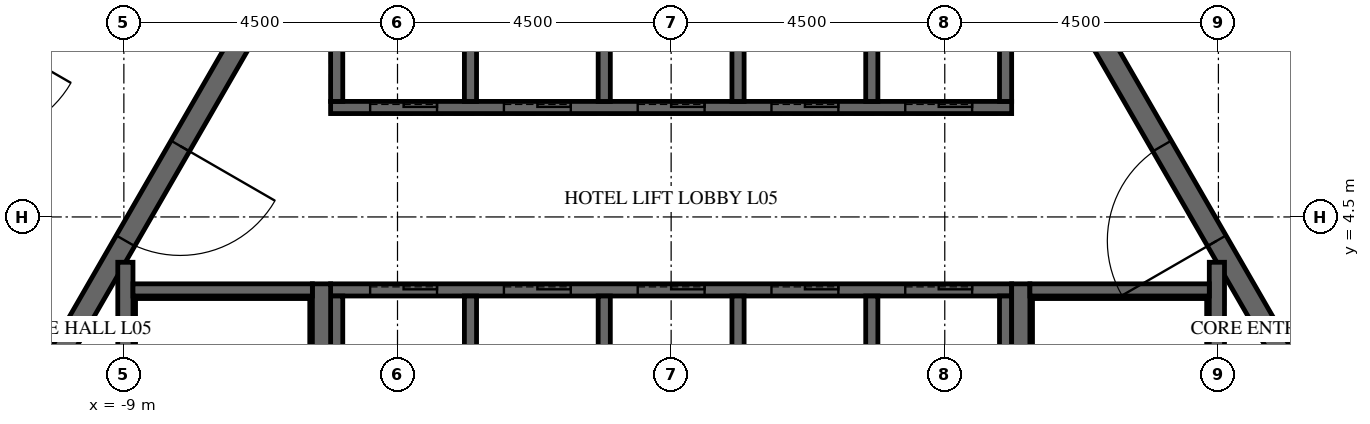
"""IFC4 building model, lengths in metres.
Left out: names, types, materials, properties, quantities, classifications, styles, units other than length and angle.
Written with IfcOpenShell. Run it as: python <this file> out.ifc"""

import sys

from ifc_helpers import new_model, si_unit, direction, frame, frame_2d, origin, place, context, subcontext, project, spatial, polyline, rectangle, outline, extrude, element, fill, save


model = new_model("IFC4")
c1 = context("Model", 3, precision=1e-05, world=origin(), true_north=direction((0.0, 1.0)))
c2 = subcontext(c1, "Body", "Model", "MODEL_VIEW")
j1 = project(units=[si_unit("LENGTHUNIT", "METRE"), si_unit("PLANEANGLEUNIT", "RADIAN")], contexts=[c1])
p1 = place(None, origin())
s1 = spatial("IfcSite", under=j1, at=p1, CompositionType="ELEMENT")
p2 = place(p1, origin())
s2 = spatial("IfcBuilding", under=s1, at=p2, CompositionType="ELEMENT")
p3 = place(p2, frame((0.0, 0.0, 31.5)))
s3 = spatial("IfcBuildingStorey", under=s2, at=p3, CompositionType="ELEMENT", Elevation=31.5)
p4 = place(p3, frame((-7.91, 13.7, -0.3), z_axis=(0.0, 0.0, 1.0), x_axis=(-0.499999880136, -0.866025472988, 0.0)))
e1 = element("IfcWall", 1, at=p4, inside=s3, PredefinedType="SHEAR", context=c2, shape_type="SweptSolid", body=[
    extrude(outline(polyline([(-0.173, -0.3), (15.993, -0.3), (15.646, 0.3), (0.173, 0.3), (-0.173, -0.3)])), origin(), (0.0, 0.0, 1.0), 6.15),
])
p5 = place(p4, frame((7.039, 0.0, 0.3)))
e2 = element("IfcOpeningElement", 2, at=p5, cuts=e1, PredefinedType="OPENING", context=c2, shape_type="SweptSolid", body=[
    extrude(rectangle(XDim=1.8, YDim=2.4, at=frame_2d((0.9, 1.2))), frame((0.0, 0.31, 0.0), z_axis=(0.0, -1.0, 0.0), x_axis=(1.0, 0.0, 0.0)), (0.0, 0.0, 1.0), 0.62),
])
p6 = place(p3, frame((15.819, 0.0, -0.3), z_axis=(0.0, 0.0, 1.0), x_axis=(-0.499999880136, 0.866025472988, 0.0)))
e3 = element("IfcWall", 3, at=p6, inside=s3, PredefinedType="SHEAR", context=c2, shape_type="SweptSolid", body=[
    extrude(outline(polyline([(-0.173, -0.3), (15.993, -0.3), (15.646, 0.3), (0.173, 0.3), (-0.173, -0.3)])), origin(), (0.0, 0.0, 1.0), 6.15),
])
p7 = place(p6, frame((6.981, 0.0, 0.3)))
e4 = element("IfcOpeningElement", 4, at=p7, cuts=e3, PredefinedType="OPENING", context=c2, shape_type="SweptSolid", body=[
    extrude(rectangle(XDim=1.8, YDim=2.4, at=frame_2d((0.9, 1.2))), frame((0.0, 0.31, 0.0), z_axis=(0.0, -1.0, 0.0), x_axis=(1.0, 0.0, 0.0)), (0.0, 0.0, 1.0), 0.62),
])
p8 = place(p3, frame((-5.673, 9.825, -0.3), z_axis=(0.0, 0.0, 1.0), x_axis=(-0.499995046907, -0.866028263435, 0.0)))
e5 = element("IfcWall", 5, at=p8, inside=s3, PredefinedType="SHEAR", context=c2, shape_type="SweptSolid", body=[
    extrude(outline(polyline([(-0.101, -0.175), (11.446, -0.175), (11.244, 0.175), (0.101, 0.175), (-0.101, -0.175)])), origin(), (0.0, 0.0, 1.0), 6.15),
])
p9 = place(p8, frame((4.801, 0.0, 0.3)))
e6 = element("IfcOpeningElement", 6, at=p9, cuts=e5, PredefinedType="OPENING", context=c2, shape_type="SweptSolid", body=[
    extrude(rectangle(XDim=1.8, YDim=2.4, at=frame_2d((0.9, 1.2))), frame((0.0, 0.185, 0.0), z_axis=(0.0, -1.0, 0.0), x_axis=(1.0, 0.0, 0.0)), (0.0, 0.0, 1.0), 0.37),
])
p10 = place(p3, frame((11.345, 0.0, -0.3), z_axis=(0.0, 0.0, 1.0), x_axis=(-0.499995046907, 0.866028263435, 0.0)))
e7 = element("IfcWall", 7, at=p10, inside=s3, PredefinedType="SHEAR", context=c2, shape_type="SweptSolid", body=[
    extrude(outline(polyline([(-0.101, -0.175), (11.446, -0.175), (11.244, 0.175), (0.101, 0.175), (-0.101, -0.175)])), origin(), (0.0, 0.0, 1.0), 6.15),
])
p11 = place(p10, frame((4.744, 0.0, 0.3)))
e8 = element("IfcOpeningElement", 8, at=p11, cuts=e7, PredefinedType="OPENING", context=c2, shape_type="SweptSolid", body=[
    extrude(rectangle(XDim=1.8, YDim=2.4, at=frame_2d((0.9, 1.2))), frame((0.0, 0.185, 0.0), z_axis=(0.0, -1.0, 0.0), x_axis=(1.0, 0.0, 0.0)), (0.0, 0.0, 1.0), 0.37),
])
p12 = place(p3, frame((-5.6, 6.3, -0.25), z_axis=(0.0, 0.0, 1.0), x_axis=(1.0, 0.0, 0.0)))
e9 = element("IfcWall", 9, at=p12, inside=s3, PredefinedType="SHEAR", context=c2, shape_type="SweptSolid", body=[
    extrude(rectangle(XDim=11.2, YDim=0.2, at=frame_2d((5.6, 0.0))), origin(), (0.0, 0.0, 1.0), 6.0),
])
p13 = place(p12, frame((0.65, 0.0, 0.25)))
e10 = element("IfcOpeningElement", 10, at=p13, cuts=e9, PredefinedType="OPENING", context=c2, shape_type="SweptSolid", body=[
    extrude(rectangle(XDim=1.1, YDim=2.1, at=frame_2d((0.55, 1.05))), frame((0.0, 0.11, 0.0), z_axis=(0.0, -1.0, 0.0), x_axis=(1.0, 0.0, 0.0)), (0.0, 0.0, 1.0), 0.22),
])
p14 = place(p12, frame((2.85, 0.0, 0.25)))
e11 = element("IfcOpeningElement", 11, at=p14, cuts=e9, PredefinedType="OPENING", context=c2, shape_type="SweptSolid", body=[
    extrude(rectangle(XDim=1.1, YDim=2.1, at=frame_2d((0.55, 1.05))), frame((0.0, 0.11, 0.0), z_axis=(0.0, -1.0, 0.0), x_axis=(1.0, 0.0, 0.0)), (0.0, 0.0, 1.0), 0.22),
])
p15 = place(p12, frame((5.05, 0.0, 0.25)))
e12 = element("IfcOpeningElement", 12, at=p15, cuts=e9, PredefinedType="OPENING", context=c2, shape_type="SweptSolid", body=[
    extrude(rectangle(XDim=1.1, YDim=2.1, at=frame_2d((0.55, 1.05))), frame((0.0, 0.11, 0.0), z_axis=(0.0, -1.0, 0.0), x_axis=(1.0, 0.0, 0.0)), (0.0, 0.0, 1.0), 0.22),
])
p16 = place(p12, frame((7.25, 0.0, 0.25)))
e13 = element("IfcOpeningElement", 13, at=p16, cuts=e9, PredefinedType="OPENING", context=c2, shape_type="SweptSolid", body=[
    extrude(rectangle(XDim=1.1, YDim=2.1, at=frame_2d((0.55, 1.05))), frame((0.0, 0.11, 0.0), z_axis=(0.0, -1.0, 0.0), x_axis=(1.0, 0.0, 0.0)), (0.0, 0.0, 1.0), 0.22),
])
p17 = place(p12, frame((9.45, 0.0, 0.25)))
e14 = element("IfcOpeningElement", 14, at=p17, cuts=e9, PredefinedType="OPENING", context=c2, shape_type="SweptSolid", body=[
    extrude(rectangle(XDim=1.1, YDim=2.1, at=frame_2d((0.55, 1.05))), frame((0.0, 0.11, 0.0), z_axis=(0.0, -1.0, 0.0), x_axis=(1.0, 0.0, 0.0)), (0.0, 0.0, 1.0), 0.22),
])
for number, where, z_axis, x_axis in (
    (15, (-5.5, 6.4, -0.25), (0.0, 0.0, 1.0), (0.0, 1.0, 0.0)),
    (16, (-3.3, 6.4, -0.25), (0.0, 0.0, 1.0), (0.0, 1.0, 0.0)),
    (17, (-1.1, 6.4, -0.25), (0.0, 0.0, 1.0), (0.0, 1.0, 0.0)),
    (18, (1.1, 6.4, -0.25), (0.0, 0.0, 1.0), (0.0, 1.0, 0.0)),
    (19, (3.3, 6.4, -0.25), (0.0, 0.0, 1.0), (0.0, 1.0, 0.0)),
    (20, (5.5, 6.4, -0.25), (0.0, 0.0, 1.0), (0.0, 1.0, 0.0)),
):
    element("IfcWall", number, at=place(p3, frame(where, z_axis=z_axis, x_axis=x_axis)), inside=s3, PredefinedType="SHEAR", context=c2, shape_type="SweptSolid", body=[
        extrude(rectangle(XDim=2.9, YDim=0.2, at=frame_2d((1.45, 0.0))), origin(), (0.0, 0.0, 1.0), 6.0),
    ])
p18 = place(p3, frame((-5.6, 3.3, -0.25), z_axis=(0.0, 0.0, 1.0), x_axis=(1.0, 0.0, 0.0)))
e21 = element("IfcWall", 21, at=p18, inside=s3, PredefinedType="SHEAR", context=c2, shape_type="SweptSolid", body=[
    extrude(rectangle(XDim=11.2, YDim=0.2, at=frame_2d((5.6, 0.0))), origin(), (0.0, 0.0, 1.0), 6.0),
])
p19 = place(p18, frame((0.65, 0.0, 0.25)))
e22 = element("IfcOpeningElement", 22, at=p19, cuts=e21, PredefinedType="OPENING", context=c2, shape_type="SweptSolid", body=[
    extrude(rectangle(XDim=1.1, YDim=2.1, at=frame_2d((0.55, 1.05))), frame((0.0, 0.11, 0.0), z_axis=(0.0, -1.0, 0.0), x_axis=(1.0, 0.0, 0.0)), (0.0, 0.0, 1.0), 0.22),
])
p20 = place(p18, frame((2.85, 0.0, 0.25)))
e23 = element("IfcOpeningElement", 23, at=p20, cuts=e21, PredefinedType="OPENING", context=c2, shape_type="SweptSolid", body=[
    extrude(rectangle(XDim=1.1, YDim=2.1, at=frame_2d((0.55, 1.05))), frame((0.0, 0.11, 0.0), z_axis=(0.0, -1.0, 0.0), x_axis=(1.0, 0.0, 0.0)), (0.0, 0.0, 1.0), 0.22),
])
p21 = place(p18, frame((5.05, 0.0, 0.25)))
e24 = element("IfcOpeningElement", 24, at=p21, cuts=e21, PredefinedType="OPENING", context=c2, shape_type="SweptSolid", body=[
    extrude(rectangle(XDim=1.1, YDim=2.1, at=frame_2d((0.55, 1.05))), frame((0.0, 0.11, 0.0), z_axis=(0.0, -1.0, 0.0), x_axis=(1.0, 0.0, 0.0)), (0.0, 0.0, 1.0), 0.22),
])
p22 = place(p18, frame((7.25, 0.0, 0.25)))
e25 = element("IfcOpeningElement", 25, at=p22, cuts=e21, PredefinedType="OPENING", context=c2, shape_type="SweptSolid", body=[
    extrude(rectangle(XDim=1.1, YDim=2.1, at=frame_2d((0.55, 1.05))), frame((0.0, 0.11, 0.0), z_axis=(0.0, -1.0, 0.0), x_axis=(1.0, 0.0, 0.0)), (0.0, 0.0, 1.0), 0.22),
])
p23 = place(p18, frame((9.45, 0.0, 0.25)))
e26 = element("IfcOpeningElement", 26, at=p23, cuts=e21, PredefinedType="OPENING", context=c2, shape_type="SweptSolid", body=[
    extrude(rectangle(XDim=1.1, YDim=2.1, at=frame_2d((0.55, 1.05))), frame((0.0, 0.11, 0.0), z_axis=(0.0, -1.0, 0.0), x_axis=(1.0, 0.0, 0.0)), (0.0, 0.0, 1.0), 0.22),
])
for number, where, z_axis, x_axis in (
    (27, (-5.5, 0.1, -0.25), (0.0, 0.0, 1.0), (0.0, 1.0, 0.0)),
    (28, (-3.3, 0.1, -0.25), (0.0, 0.0, 1.0), (0.0, 1.0, 0.0)),
    (29, (-1.1, 0.1, -0.25), (0.0, 0.0, 1.0), (0.0, 1.0, 0.0)),
    (30, (1.1, 0.1, -0.25), (0.0, 0.0, 1.0), (0.0, 1.0, 0.0)),
    (31, (3.3, 0.1, -0.25), (0.0, 0.0, 1.0), (0.0, 1.0, 0.0)),
    (32, (5.5, 0.1, -0.25), (0.0, 0.0, 1.0), (0.0, 1.0, 0.0)),
):
    element("IfcWall", number, at=place(p3, frame(where, z_axis=z_axis, x_axis=x_axis)), inside=s3, PredefinedType="SHEAR", context=c2, shape_type="SweptSolid", body=[
        extrude(rectangle(XDim=3.1, YDim=0.2, at=frame_2d((1.55, 0.0))), origin(), (0.0, 0.0, 1.0), 6.0),
    ])
p24 = place(p3, frame((5.75, -3.4, -0.25), z_axis=(0.0, 0.0, 1.0), x_axis=(0.0, 1.0, 0.0)))
e33 = element("IfcWall", 33, at=p24, inside=s3, PredefinedType="SHEAR", context=c2, shape_type="SweptSolid", body=[
    extrude(rectangle(XDim=6.8, YDim=0.3, at=frame_2d((3.4, 0.0))), origin(), (0.0, 0.0, 1.0), 6.0),
])
p25 = place(p3, frame((8.975, -3.755, -0.25), z_axis=(0.0, 0.0, 1.0), x_axis=(0.0, 1.0, 0.0)))
e34 = element("IfcWall", 34, at=p25, inside=s3, PredefinedType="SHEAR", context=c2, shape_type="SweptSolid", body=[
    extrude(rectangle(XDim=7.51, YDim=0.25, at=frame_2d((3.755, 0.0))), origin(), (0.0, 0.0, 1.0), 6.0),
])
p26 = place(p3, frame((5.9, 3.3, -0.25), z_axis=(0.0, 0.0, 1.0), x_axis=(1.0, 0.0, 0.0)))
e35 = element("IfcWall", 35, at=p26, inside=s3, PredefinedType="SHEAR", context=c2, shape_type="SweptSolid", body=[
    extrude(rectangle(XDim=2.95, YDim=0.2, at=frame_2d((1.475, 0.0))), origin(), (0.0, 0.0, 1.0), 6.0),
])
p27 = place(p3, frame((-5.75, -3.4, -0.25), z_axis=(0.0, 0.0, 1.0), x_axis=(0.0, 1.0, 0.0)))
e36 = element("IfcWall", 36, at=p27, inside=s3, PredefinedType="SHEAR", context=c2, shape_type="SweptSolid", body=[
    extrude(rectangle(XDim=6.8, YDim=0.3, at=frame_2d((3.4, 0.0))), origin(), (0.0, 0.0, 1.0), 6.0),
])
p28 = place(p3, frame((-8.975, -3.755, -0.25), z_axis=(0.0, 0.0, 1.0), x_axis=(0.0, 1.0, 0.0)))
e37 = element("IfcWall", 37, at=p28, inside=s3, PredefinedType="SHEAR", context=c2, shape_type="SweptSolid", body=[
    extrude(rectangle(XDim=7.51, YDim=0.25, at=frame_2d((3.755, 0.0))), origin(), (0.0, 0.0, 1.0), 6.0),
])
p29 = place(p3, frame((-8.85, 3.3, -0.25), z_axis=(0.0, 0.0, 1.0), x_axis=(1.0, 0.0, 0.0)))
e38 = element("IfcWall", 38, at=p29, inside=s3, PredefinedType="SHEAR", context=c2, shape_type="SweptSolid", body=[
    extrude(rectangle(XDim=2.95, YDim=0.2, at=frame_2d((1.475, 0.0))), origin(), (0.0, 0.0, 1.0), 6.0),
])
p30 = place(p3, frame((18.513, 2.734, 0.0), z_axis=(0.0, 0.0, 1.0), x_axis=(-0.499982347303, 0.866035595334, 0.0)))
e39 = element("IfcWall", 39, at=p30, inside=s3, PredefinedType="PARTITIONING", context=c2, shape_type="SweptSolid", body=[
    extrude(rectangle(XDim=16.588, YDim=0.2, at=frame_2d((8.294, 0.0))), origin(), (0.0, 0.0, 1.0), 5.85),
])
p31 = place(p9, origin())
e40 = element("IfcDoor", 40, at=p31, inside=s3, OperationType="DOUBLE_DOOR_SINGLE_SWING", PredefinedType="DOOR", context=c2, shape_type="SweptSolid", body=[
    extrude(rectangle(XDim=1.8, YDim=2.4, at=frame_2d((0.9, 1.2))), frame((0.0, 0.025, 0.0), z_axis=(0.0, -1.0, 0.0), x_axis=(1.0, 0.0, 0.0)), (0.0, 0.0, 1.0), 0.05),
])
fill(e6, e40)
p32 = place(p11, origin())
e41 = element("IfcDoor", 41, at=p32, inside=s3, OperationType="DOUBLE_DOOR_SINGLE_SWING", PredefinedType="DOOR", context=c2, shape_type="SweptSolid", body=[
    extrude(rectangle(XDim=1.8, YDim=2.4, at=frame_2d((0.9, 1.2))), frame((0.0, 0.025, 0.0), z_axis=(0.0, -1.0, 0.0), x_axis=(1.0, 0.0, 0.0)), (0.0, 0.0, 1.0), 0.05),
])
fill(e8, e41)
p33 = place(p13, origin())
e42 = element("IfcDoor", 42, at=p33, inside=s3, OperationType="SLIDING_TO_LEFT", PredefinedType="DOOR", context=c2, shape_type="SweptSolid", body=[
    extrude(rectangle(XDim=1.1, YDim=2.1, at=frame_2d((0.55, 1.05))), frame((0.0, 0.025, 0.0), z_axis=(0.0, -1.0, 0.0), x_axis=(1.0, 0.0, 0.0)), (0.0, 0.0, 1.0), 0.05),
])
fill(e10, e42)
p34 = place(p14, origin())
e43 = element("IfcDoor", 43, at=p34, inside=s3, OperationType="SLIDING_TO_LEFT", PredefinedType="DOOR", context=c2, shape_type="SweptSolid", body=[
    extrude(rectangle(XDim=1.1, YDim=2.1, at=frame_2d((0.55, 1.05))), frame((0.0, 0.025, 0.0), z_axis=(0.0, -1.0, 0.0), x_axis=(1.0, 0.0, 0.0)), (0.0, 0.0, 1.0), 0.05),
])
fill(e11, e43)
p35 = place(p15, origin())
e44 = element("IfcDoor", 44, at=p35, inside=s3, OperationType="SLIDING_TO_LEFT", PredefinedType="DOOR", context=c2, shape_type="SweptSolid", body=[
    extrude(rectangle(XDim=1.1, YDim=2.1, at=frame_2d((0.55, 1.05))), frame((0.0, 0.025, 0.0), z_axis=(0.0, -1.0, 0.0), x_axis=(1.0, 0.0, 0.0)), (0.0, 0.0, 1.0), 0.05),
])
fill(e12, e44)
p36 = place(p16, origin())
e45 = element("IfcDoor", 45, at=p36, inside=s3, OperationType="SLIDING_TO_LEFT", PredefinedType="DOOR", context=c2, shape_type="SweptSolid", body=[
    extrude(rectangle(XDim=1.1, YDim=2.1, at=frame_2d((0.55, 1.05))), frame((0.0, 0.025, 0.0), z_axis=(0.0, -1.0, 0.0), x_axis=(1.0, 0.0, 0.0)), (0.0, 0.0, 1.0), 0.05),
])
fill(e13, e45)
p37 = place(p17, origin())
e46 = element("IfcDoor", 46, at=p37, inside=s3, OperationType="SLIDING_TO_LEFT", PredefinedType="DOOR", context=c2, shape_type="SweptSolid", body=[
    extrude(rectangle(XDim=1.1, YDim=2.1, at=frame_2d((0.55, 1.05))), frame((0.0, 0.025, 0.0), z_axis=(0.0, -1.0, 0.0), x_axis=(1.0, 0.0, 0.0)), (0.0, 0.0, 1.0), 0.05),
])
fill(e14, e46)
p38 = place(p19, origin())
e47 = element("IfcDoor", 47, at=p38, inside=s3, OperationType="SLIDING_TO_LEFT", PredefinedType="DOOR", context=c2, shape_type="SweptSolid", body=[
    extrude(rectangle(XDim=1.1, YDim=2.1, at=frame_2d((0.55, 1.05))), frame((0.0, 0.025, 0.0), z_axis=(0.0, -1.0, 0.0), x_axis=(1.0, 0.0, 0.0)), (0.0, 0.0, 1.0), 0.05),
])
fill(e22, e47)
p39 = place(p20, origin())
e48 = element("IfcDoor", 48, at=p39, inside=s3, OperationType="SLIDING_TO_LEFT", PredefinedType="DOOR", context=c2, shape_type="SweptSolid", body=[
    extrude(rectangle(XDim=1.1, YDim=2.1, at=frame_2d((0.55, 1.05))), frame((0.0, 0.025, 0.0), z_axis=(0.0, -1.0, 0.0), x_axis=(1.0, 0.0, 0.0)), (0.0, 0.0, 1.0), 0.05),
])
fill(e23, e48)
p40 = place(p21, origin())
e49 = element("IfcDoor", 49, at=p40, inside=s3, OperationType="SLIDING_TO_LEFT", PredefinedType="DOOR", context=c2, shape_type="SweptSolid", body=[
    extrude(rectangle(XDim=1.1, YDim=2.1, at=frame_2d((0.55, 1.05))), frame((0.0, 0.025, 0.0), z_axis=(0.0, -1.0, 0.0), x_axis=(1.0, 0.0, 0.0)), (0.0, 0.0, 1.0), 0.05),
])
fill(e24, e49)
p41 = place(p22, origin())
e50 = element("IfcDoor", 50, at=p41, inside=s3, OperationType="SLIDING_TO_LEFT", PredefinedType="DOOR", context=c2, shape_type="SweptSolid", body=[
    extrude(rectangle(XDim=1.1, YDim=2.1, at=frame_2d((0.55, 1.05))), frame((0.0, 0.025, 0.0), z_axis=(0.0, -1.0, 0.0), x_axis=(1.0, 0.0, 0.0)), (0.0, 0.0, 1.0), 0.05),
])
fill(e25, e50)
p42 = place(p23, origin())
e51 = element("IfcDoor", 51, at=p42, inside=s3, OperationType="SLIDING_TO_LEFT", PredefinedType="DOOR", context=c2, shape_type="SweptSolid", body=[
    extrude(rectangle(XDim=1.1, YDim=2.1, at=frame_2d((0.55, 1.05))), frame((0.0, 0.025, 0.0), z_axis=(0.0, -1.0, 0.0), x_axis=(1.0, 0.0, 0.0)), (0.0, 0.0, 1.0), 0.05),
])
fill(e26, e51)
save(model, sys.argv[1])
